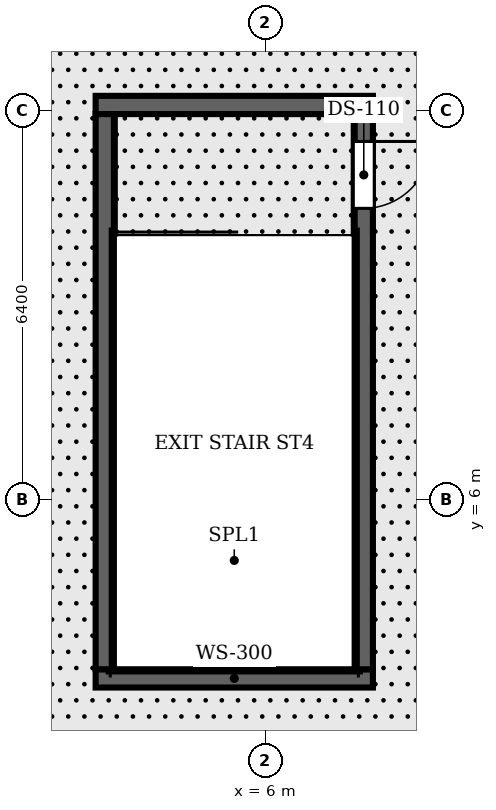
"""IFC4 building model, lengths in metres.
Left out: names, types, materials, properties, quantities, classifications, styles, units other than length and angle.
Written with IfcOpenShell. Run it as: python <this file> out.ifc"""

import sys

from ifc_helpers import new_model, si_unit, direction, frame, frame_2d, origin, place, context, subcontext, project, spatial, rectangle, extrude, element, fill, save


model = new_model("IFC4")
c1 = context("Model", 3, precision=1e-05, world=origin(), true_north=direction((0.0, 1.0)))
c2 = subcontext(c1, "Body", "Model", "MODEL_VIEW")
j1 = project(units=[si_unit("LENGTHUNIT", "METRE"), si_unit("PLANEANGLEUNIT", "RADIAN")], contexts=[c1])
p1 = place(None, origin())
s1 = spatial("IfcSite", under=j1, at=p1, CompositionType="ELEMENT")
p2 = place(p1, origin())
s2 = spatial("IfcBuilding", under=s1, at=p2, CompositionType="ELEMENT")
p3 = place(p2, frame((0.0, 0.0, 35.4)))
s3 = spatial("IfcBuildingStorey", under=s2, at=p3, CompositionType="ELEMENT", Elevation=35.4)
for number, where, z_axis, x_axis in (
    (1, (3.21, 3.06, 0.0), (0.0, 0.0, 1.0), (1.0, 0.0, 0.0)),
    (2, (3.21, 12.49, 0.0), (0.0, 0.0, 1.0), (1.0, 0.0, 0.0)),
):
    element("IfcWall", number, at=place(p3, frame(where, z_axis=z_axis, x_axis=x_axis)), inside=s3, PredefinedType="SHEAR", context=c2, shape_type="SweptSolid", body=[
        extrude(rectangle(XDim=4.56, YDim=0.3, at=frame_2d((2.28, 0.0))), origin(), (0.0, 0.0, 1.0), 4.8),
    ])
p4 = place(p3, frame((3.36, 3.21, 0.0), z_axis=(0.0, 0.0, 1.0), x_axis=(0.0, 1.0, 0.0)))
e3 = element("IfcWall", 3, at=p4, inside=s3, PredefinedType="SHEAR", context=c2, shape_type="SweptSolid", body=[
    extrude(rectangle(XDim=9.13, YDim=0.3, at=frame_2d((4.565, 0.0))), origin(), (0.0, 0.0, 1.0), 4.8),
])
p5 = place(p3, frame((7.62, 12.34, 0.0), z_axis=(0.0, 0.0, 1.0), x_axis=(0.0, -1.0, 0.0)))
e4 = element("IfcWall", 4, at=p5, inside=s3, PredefinedType="SHEAR", context=c2, shape_type="SweptSolid", body=[
    extrude(rectangle(XDim=9.13, YDim=0.3, at=frame_2d((4.565, 0.0))), origin(), (0.0, 0.0, 1.0), 4.8),
])
p6 = place(p5, frame((0.45, 0.0, 0.0)))
e5 = element("IfcOpeningElement", 5, at=p6, cuts=e4, PredefinedType="OPENING", context=c2, shape_type="SweptSolid", body=[
    extrude(rectangle(XDim=1.1, YDim=2.15, at=frame_2d((0.55, 1.075))), frame((0.0, 0.16, 0.0), z_axis=(0.0, -1.0, 0.0), x_axis=(1.0, 0.0, 0.0)), (0.0, 0.0, 1.0), 0.32),
])
p7 = place(p6, origin())
e6 = element("IfcDoor", 6, at=p7, inside=s3, OperationType="SINGLE_SWING_LEFT", PredefinedType="DOOR", context=c2, shape_type="SweptSolid", body=[
    extrude(rectangle(XDim=1.1, YDim=2.15, at=frame_2d((0.55, 1.075))), frame((0.0, 0.025, 0.0), z_axis=(0.0, -1.0, 0.0), x_axis=(1.0, 0.0, 0.0)), (0.0, 0.0, 1.0), 0.05),
])
fill(e5, e6)
save(model, sys.argv[1])
